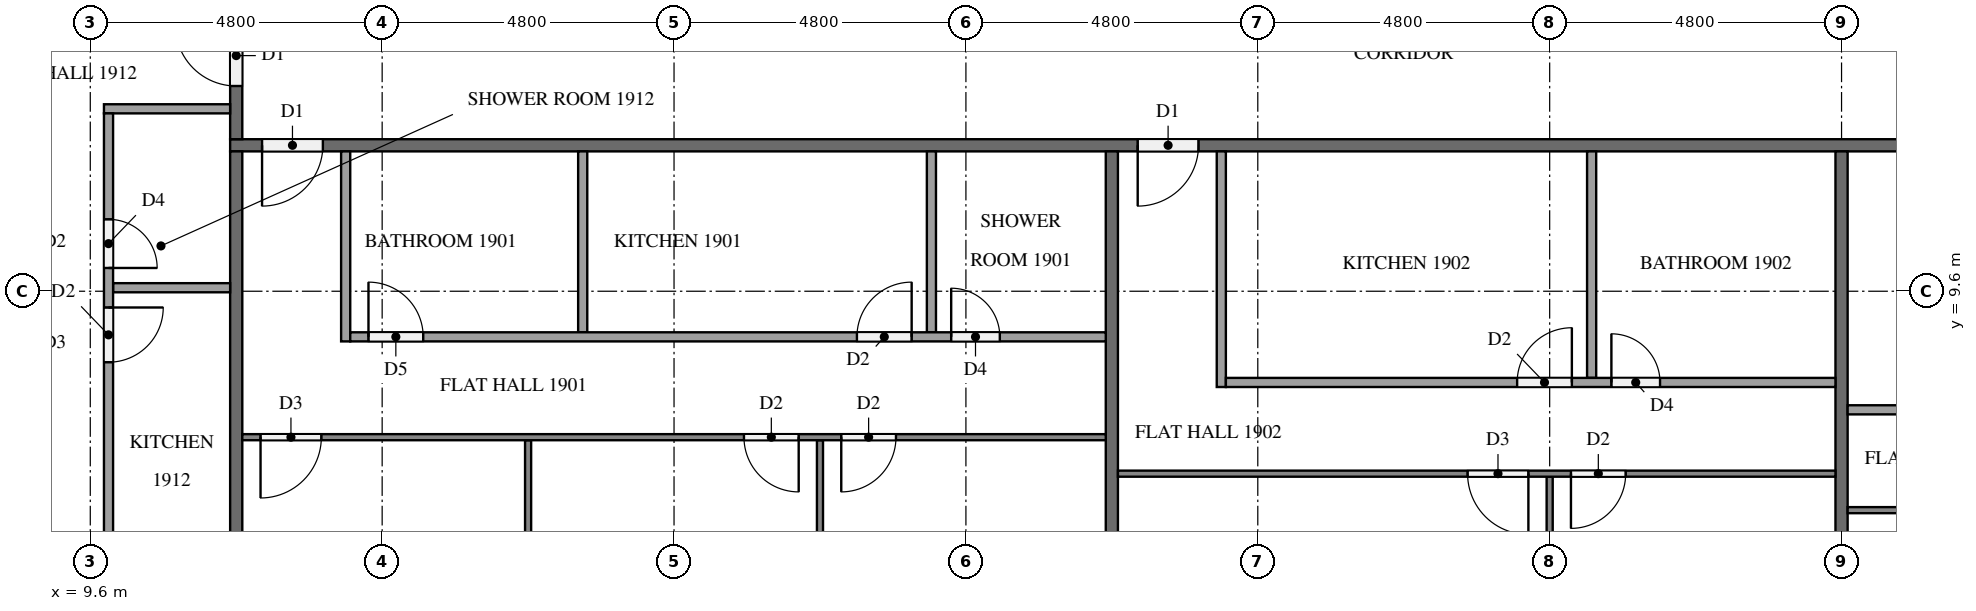
"""IFC4 building model, lengths in metres.
Left out: names, types, materials, properties, quantities, classifications, styles, units other than length and angle.
Written with IfcOpenShell. Run it as: python <this file> out.ifc"""

import sys

from ifc_helpers import new_model, si_unit, direction, frame, frame_2d, origin, place, context, subcontext, project, spatial, rectangle, extrude, element, fill, save


model = new_model("IFC4")
c1 = context("Model", 3, precision=1e-05, world=origin(), true_north=direction((0.0, 1.0)))
c2 = subcontext(c1, "Body", "Model", "MODEL_VIEW")
j1 = project(units=[si_unit("LENGTHUNIT", "METRE"), si_unit("PLANEANGLEUNIT", "RADIAN")], contexts=[c1])
p1 = place(None, origin())
s1 = spatial("IfcSite", under=j1, at=p1, CompositionType="ELEMENT")
p2 = place(p1, origin())
s2 = spatial("IfcBuilding", under=s1, at=p2, CompositionType="ELEMENT")
p3 = place(p2, frame((0.0, 0.0, 76.8)))
s3 = spatial("IfcBuildingStorey", under=s2, at=p3, CompositionType="ELEMENT", Elevation=76.8)
p4 = place(p3, frame((50.5, 12.0, 0.0), z_axis=(0.0, 0.0, 1.0), x_axis=(-1.0, 0.0, 0.0)))
e1 = element("IfcWall", 1, at=p4, inside=s3, PredefinedType="PARTITIONING", context=c2, shape_type="SweptSolid", body=[
    extrude(rectangle(XDim=38.6, YDim=0.2, at=frame_2d((19.3, 0.0))), origin(), (0.0, 0.0, 1.0), 3.2),
])
p5 = place(p4, frame((37.075, 0.0, 0.0)))
e2 = element("IfcOpeningElement", 2, at=p5, cuts=e1, PredefinedType="OPENING", context=c2, shape_type="SweptSolid", body=[
    extrude(rectangle(XDim=1.0, YDim=2.1, at=frame_2d((0.5, 1.05))), frame((0.0, 0.11, 0.0), z_axis=(0.0, -1.0, 0.0), x_axis=(1.0, 0.0, 0.0)), (0.0, 0.0, 1.0), 0.22),
])
p6 = place(p4, frame((22.675, 0.0, 0.0)))
e3 = element("IfcOpeningElement", 3, at=p6, cuts=e1, PredefinedType="OPENING", context=c2, shape_type="SweptSolid", body=[
    extrude(rectangle(XDim=1.0, YDim=2.1, at=frame_2d((0.5, 1.05))), frame((0.0, 0.11, 0.0), z_axis=(0.0, -1.0, 0.0), x_axis=(1.0, 0.0, 0.0)), (0.0, 0.0, 1.0), 0.22),
])
p7 = place(p4, frame((0.525, 0.0, 0.0)))
e4 = element("IfcOpeningElement", 4, at=p7, cuts=e1, PredefinedType="OPENING", context=c2, shape_type="SweptSolid", body=[
    extrude(rectangle(XDim=1.0, YDim=2.1, at=frame_2d((0.5, 1.05))), frame((0.0, 0.11, 0.0), z_axis=(0.0, -1.0, 0.0), x_axis=(1.0, 0.0, 0.0)), (0.0, 0.0, 1.0), 0.22),
])
p8 = place(p3, frame((12.0, 12.1, 0.0), z_axis=(0.0, 0.0, 1.0), x_axis=(0.0, 1.0, 0.0)))
e5 = element("IfcWall", 5, at=p8, inside=s3, PredefinedType="PARTITIONING", context=c2, shape_type="SweptSolid", body=[
    extrude(rectangle(XDim=28.6, YDim=0.2, at=frame_2d((14.3, 0.0))), origin(), (0.0, 0.0, 1.0), 3.2),
])
p9 = place(p8, frame((14.725, 0.0, 0.0)))
e6 = element("IfcOpeningElement", 6, at=p9, cuts=e5, PredefinedType="OPENING", context=c2, shape_type="SweptSolid", body=[
    extrude(rectangle(XDim=1.0, YDim=2.1, at=frame_2d((0.5, 1.05))), frame((0.0, 0.11, 0.0), z_axis=(0.0, -1.0, 0.0), x_axis=(1.0, 0.0, 0.0)), (0.0, 0.0, 1.0), 0.22),
])
p10 = place(p8, frame((12.875, 0.0, 0.0)))
e7 = element("IfcOpeningElement", 7, at=p10, cuts=e5, PredefinedType="OPENING", context=c2, shape_type="SweptSolid", body=[
    extrude(rectangle(XDim=1.0, YDim=2.1, at=frame_2d((0.5, 1.05))), frame((0.0, 0.11, 0.0), z_axis=(0.0, -1.0, 0.0), x_axis=(1.0, 0.0, 0.0)), (0.0, 0.0, 1.0), 0.22),
])
p11 = place(p8, frame((0.875, 0.0, 0.0)))
e8 = element("IfcOpeningElement", 8, at=p11, cuts=e5, PredefinedType="OPENING", context=c2, shape_type="SweptSolid", body=[
    extrude(rectangle(XDim=1.0, YDim=2.1, at=frame_2d((0.5, 1.05))), frame((0.0, 0.11, 0.0), z_axis=(0.0, -1.0, 0.0), x_axis=(1.0, 0.0, 0.0)), (0.0, 0.0, 1.0), 0.22),
])
for number, where, z_axis, x_axis in (
    (9, (26.4, 11.9, 0.0), (0.0, 0.0, 1.0), (0.0, -1.0, 0.0)),
    (10, (12.0, 0.1, 0.0), (0.0, 0.0, 1.0), (0.0, 1.0, 0.0)),
):
    element("IfcWall", number, at=place(p3, frame(where, z_axis=z_axis, x_axis=x_axis)), inside=s3, PredefinedType="PARTITIONING", context=c2, shape_type="SweptSolid", body=[
        extrude(rectangle(XDim=11.8, YDim=0.2, at=frame_2d((5.9, 0.0))), origin(), (0.0, 0.0, 1.0), 3.2),
    ])
p12 = place(p3, frame((38.4, 11.9, 0.0), z_axis=(0.0, 0.0, 1.0), x_axis=(0.0, -1.0, 0.0)))
e11 = element("IfcWall", 11, at=p12, inside=s3, PredefinedType="PARTITIONING", context=c2, shape_type="SweptSolid", body=[
    extrude(rectangle(XDim=11.475, YDim=0.2, at=frame_2d((5.737, 0.0))), origin(), (0.0, 0.0, 1.0), 3.2),
])
for number, where, z_axis, x_axis in (
    (12, (16.8, 7.15, 0.0), (0.0, 0.0, 1.0), (0.0, -1.0, 0.0)),
    (13, (21.6, 7.15, 0.0), (0.0, 0.0, 1.0), (0.0, -1.0, 0.0)),
):
    element("IfcWall", number, at=place(p3, frame(where, z_axis=z_axis, x_axis=x_axis)), inside=s3, PredefinedType="PARTITIONING", context=c2, shape_type="SweptSolid", body=[
        extrude(rectangle(XDim=7.05, YDim=0.1, at=frame_2d((3.525, 0.0))), origin(), (0.0, 0.0, 1.0), 3.2),
    ])
p13 = place(p3, frame((26.3, 7.2, 0.0), z_axis=(0.0, 0.0, 1.0), x_axis=(-1.0, 0.0, 0.0)))
e14 = element("IfcWall", 14, at=p13, inside=s3, PredefinedType="PARTITIONING", context=c2, shape_type="SweptSolid", body=[
    extrude(rectangle(XDim=14.2, YDim=0.1, at=frame_2d((7.1, 0.0))), origin(), (0.0, 0.0, 1.0), 3.2),
])
p14 = place(p13, frame((12.9, 0.0, 0.0)))
e15 = element("IfcOpeningElement", 15, at=p14, cuts=e14, PredefinedType="OPENING", context=c2, shape_type="SweptSolid", body=[
    extrude(rectangle(XDim=1.0, YDim=2.1, at=frame_2d((0.5, 1.05))), frame((0.0, 0.06, 0.0), z_axis=(0.0, -1.0, 0.0), x_axis=(1.0, 0.0, 0.0)), (0.0, 0.0, 1.0), 0.12),
])
p15 = place(p13, frame((5.05, 0.0, 0.0)))
e16 = element("IfcOpeningElement", 16, at=p15, cuts=e14, PredefinedType="OPENING", context=c2, shape_type="SweptSolid", body=[
    extrude(rectangle(XDim=0.9, YDim=2.1, at=frame_2d((0.45, 1.05))), frame((0.0, 0.06, 0.0), z_axis=(0.0, -1.0, 0.0), x_axis=(1.0, 0.0, 0.0)), (0.0, 0.0, 1.0), 0.12),
])
p16 = place(p13, frame((3.45, 0.0, 0.0)))
e17 = element("IfcOpeningElement", 17, at=p16, cuts=e14, PredefinedType="OPENING", context=c2, shape_type="SweptSolid", body=[
    extrude(rectangle(XDim=0.9, YDim=2.1, at=frame_2d((0.45, 1.05))), frame((0.0, 0.06, 0.0), z_axis=(0.0, -1.0, 0.0), x_axis=(1.0, 0.0, 0.0)), (0.0, 0.0, 1.0), 0.12),
])
for number, where, z_axis, x_axis in (
    (18, (17.698, 11.9, 0.0), (0.0, 0.0, 1.0), (0.0, -1.0, 0.0)),
    (19, (23.433, 11.9, 0.0), (0.0, 0.0, 1.0), (0.0, -1.0, 0.0)),
):
    element("IfcWall", number, at=place(p3, frame(where, z_axis=z_axis, x_axis=x_axis)), inside=s3, PredefinedType="PARTITIONING", context=c2, shape_type="SweptSolid", body=[
        extrude(rectangle(XDim=2.975, YDim=0.15, at=frame_2d((1.487, 0.0))), origin(), (0.0, 0.0, 1.0), 3.2),
    ])
p17 = place(p3, frame((13.8, 11.9, 0.0), z_axis=(0.0, 0.0, 1.0), x_axis=(0.0, -1.0, 0.0)))
e20 = element("IfcWall", 20, at=p17, inside=s3, PredefinedType="PARTITIONING", context=c2, shape_type="SweptSolid", body=[
    extrude(rectangle(XDim=3.125, YDim=0.15, at=frame_2d((1.562, 0.0))), origin(), (0.0, 0.0, 1.0), 3.2),
])
p18 = place(p3, frame((13.875, 8.85, 0.0), z_axis=(0.0, 0.0, 1.0), x_axis=(1.0, 0.0, 0.0)))
e21 = element("IfcWall", 21, at=p18, inside=s3, PredefinedType="PARTITIONING", context=c2, shape_type="SweptSolid", body=[
    extrude(rectangle(XDim=12.425, YDim=0.15, at=frame_2d((6.212, 0.0))), origin(), (0.0, 0.0, 1.0), 3.2),
])
p19 = place(p18, frame((0.3, 0.0, 0.0)))
e22 = element("IfcOpeningElement", 22, at=p19, cuts=e21, PredefinedType="OPENING", context=c2, shape_type="SweptSolid", body=[
    extrude(rectangle(XDim=0.9, YDim=2.1, at=frame_2d((0.45, 1.05))), frame((0.0, 0.085, 0.0), z_axis=(0.0, -1.0, 0.0), x_axis=(1.0, 0.0, 0.0)), (0.0, 0.0, 1.0), 0.17),
])
p20 = place(p18, frame((8.333, 0.0, 0.0)))
e23 = element("IfcOpeningElement", 23, at=p20, cuts=e21, PredefinedType="OPENING", context=c2, shape_type="SweptSolid", body=[
    extrude(rectangle(XDim=0.9, YDim=2.1, at=frame_2d((0.45, 1.05))), frame((0.0, 0.085, 0.0), z_axis=(0.0, -1.0, 0.0), x_axis=(1.0, 0.0, 0.0)), (0.0, 0.0, 1.0), 0.17),
])
p21 = place(p18, frame((9.883, 0.0, 0.0)))
e24 = element("IfcOpeningElement", 24, at=p21, cuts=e21, PredefinedType="OPENING", context=c2, shape_type="SweptSolid", body=[
    extrude(rectangle(XDim=0.8, YDim=2.1, at=frame_2d((0.4, 1.05))), frame((0.0, 0.085, 0.0), z_axis=(0.0, -1.0, 0.0), x_axis=(1.0, 0.0, 0.0)), (0.0, 0.0, 1.0), 0.17),
])
p22 = place(p3, frame((33.6, 6.55, 0.0), z_axis=(0.0, 0.0, 1.0), x_axis=(0.0, -1.0, 0.0)))
e25 = element("IfcWall", 25, at=p22, inside=s3, PredefinedType="PARTITIONING", context=c2, shape_type="SweptSolid", body=[
    extrude(rectangle(XDim=6.45, YDim=0.1, at=frame_2d((3.225, 0.0))), origin(), (0.0, 0.0, 1.0), 3.2),
])
p23 = place(p3, frame((38.3, 6.6, 0.0), z_axis=(0.0, 0.0, 1.0), x_axis=(-1.0, 0.0, 0.0)))
e26 = element("IfcWall", 26, at=p23, inside=s3, PredefinedType="PARTITIONING", context=c2, shape_type="SweptSolid", body=[
    extrude(rectangle(XDim=11.8, YDim=0.1, at=frame_2d((5.9, 0.0))), origin(), (0.0, 0.0, 1.0), 3.2),
])
p24 = place(p23, frame((5.05, 0.0, 0.0)))
e27 = element("IfcOpeningElement", 27, at=p24, cuts=e26, PredefinedType="OPENING", context=c2, shape_type="SweptSolid", body=[
    extrude(rectangle(XDim=1.0, YDim=2.1, at=frame_2d((0.5, 1.05))), frame((0.0, 0.06, 0.0), z_axis=(0.0, -1.0, 0.0), x_axis=(1.0, 0.0, 0.0)), (0.0, 0.0, 1.0), 0.12),
])
p25 = place(p23, frame((3.45, 0.0, 0.0)))
e28 = element("IfcOpeningElement", 28, at=p25, cuts=e26, PredefinedType="OPENING", context=c2, shape_type="SweptSolid", body=[
    extrude(rectangle(XDim=0.9, YDim=2.1, at=frame_2d((0.45, 1.05))), frame((0.0, 0.06, 0.0), z_axis=(0.0, -1.0, 0.0), x_axis=(1.0, 0.0, 0.0)), (0.0, 0.0, 1.0), 0.12),
])
p26 = place(p3, frame((34.29, 11.9, 0.0), z_axis=(0.0, 0.0, 1.0), x_axis=(0.0, -1.0, 0.0)))
e29 = element("IfcWall", 29, at=p26, inside=s3, PredefinedType="PARTITIONING", context=c2, shape_type="SweptSolid", body=[
    extrude(rectangle(XDim=3.725, YDim=0.15, at=frame_2d((1.862, 0.0))), origin(), (0.0, 0.0, 1.0), 3.2),
])
p27 = place(p3, frame((28.2, 11.9, 0.0), z_axis=(0.0, 0.0, 1.0), x_axis=(0.0, -1.0, 0.0)))
e30 = element("IfcWall", 30, at=p27, inside=s3, PredefinedType="PARTITIONING", context=c2, shape_type="SweptSolid", body=[
    extrude(rectangle(XDim=3.875, YDim=0.15, at=frame_2d((1.938, 0.0))), origin(), (0.0, 0.0, 1.0), 3.2),
])
p28 = place(p3, frame((28.275, 8.1, 0.0), z_axis=(0.0, 0.0, 1.0), x_axis=(1.0, 0.0, 0.0)))
e31 = element("IfcWall", 31, at=p28, inside=s3, PredefinedType="PARTITIONING", context=c2, shape_type="SweptSolid", body=[
    extrude(rectangle(XDim=10.025, YDim=0.15, at=frame_2d((5.013, 0.0))), origin(), (0.0, 0.0, 1.0), 3.2),
])
p29 = place(p28, frame((4.79, 0.0, 0.0)))
e32 = element("IfcOpeningElement", 32, at=p29, cuts=e31, PredefinedType="OPENING", context=c2, shape_type="SweptSolid", body=[
    extrude(rectangle(XDim=0.9, YDim=2.1, at=frame_2d((0.45, 1.05))), frame((0.0, 0.085, 0.0), z_axis=(0.0, -1.0, 0.0), x_axis=(1.0, 0.0, 0.0)), (0.0, 0.0, 1.0), 0.17),
])
p30 = place(p28, frame((6.34, 0.0, 0.0)))
e33 = element("IfcOpeningElement", 33, at=p30, cuts=e31, PredefinedType="OPENING", context=c2, shape_type="SweptSolid", body=[
    extrude(rectangle(XDim=0.8, YDim=2.1, at=frame_2d((0.4, 1.05))), frame((0.0, 0.085, 0.0), z_axis=(0.0, -1.0, 0.0), x_axis=(1.0, 0.0, 0.0)), (0.0, 0.0, 1.0), 0.17),
])
p31 = place(p3, frame((50.3, 6.0, 0.0), z_axis=(0.0, 0.0, 1.0), x_axis=(-1.0, 0.0, 0.0)))
e34 = element("IfcWall", 34, at=p31, inside=s3, PredefinedType="PARTITIONING", context=c2, shape_type="SweptSolid", body=[
    extrude(rectangle(XDim=11.8, YDim=0.1, at=frame_2d((5.9, 0.0))), origin(), (0.0, 0.0, 1.0), 3.2),
])
p32 = place(p31, frame((5.75, 0.0, 0.0)))
e35 = element("IfcOpeningElement", 35, at=p32, cuts=e34, PredefinedType="OPENING", context=c2, shape_type="SweptSolid", body=[
    extrude(rectangle(XDim=1.0, YDim=2.1, at=frame_2d((0.5, 1.05))), frame((0.0, 0.06, 0.0), z_axis=(0.0, -1.0, 0.0), x_axis=(1.0, 0.0, 0.0)), (0.0, 0.0, 1.0), 0.12),
])
p33 = place(p31, frame((7.45, 0.0, 0.0)))
e36 = element("IfcOpeningElement", 36, at=p33, cuts=e34, PredefinedType="OPENING", context=c2, shape_type="SweptSolid", body=[
    extrude(rectangle(XDim=0.9, YDim=2.1, at=frame_2d((0.45, 1.05))), frame((0.0, 0.06, 0.0), z_axis=(0.0, -1.0, 0.0), x_axis=(1.0, 0.0, 0.0)), (0.0, 0.0, 1.0), 0.12),
])
p34 = place(p3, frame((38.5, 7.65, 0.0), z_axis=(0.0, 0.0, 1.0), x_axis=(1.0, 0.0, 0.0)))
e37 = element("IfcWall", 37, at=p34, inside=s3, PredefinedType="PARTITIONING", context=c2, shape_type="SweptSolid", body=[
    extrude(rectangle(XDim=10.025, YDim=0.15, at=frame_2d((5.012, 0.0))), origin(), (0.0, 0.0, 1.0), 3.2),
])
p35 = place(p34, frame((6.34, 0.0, 0.0)))
e38 = element("IfcOpeningElement", 38, at=p35, cuts=e37, PredefinedType="OPENING", context=c2, shape_type="SweptSolid", body=[
    extrude(rectangle(XDim=0.8, YDim=2.1, at=frame_2d((0.4, 1.05))), frame((0.0, 0.085, 0.0), z_axis=(0.0, -1.0, 0.0), x_axis=(1.0, 0.0, 0.0)), (0.0, 0.0, 1.0), 0.17),
])
p36 = place(p34, frame((4.79, 0.0, 0.0)))
e39 = element("IfcOpeningElement", 39, at=p36, cuts=e37, PredefinedType="OPENING", context=c2, shape_type="SweptSolid", body=[
    extrude(rectangle(XDim=0.9, YDim=2.1, at=frame_2d((0.45, 1.05))), frame((0.0, 0.085, 0.0), z_axis=(0.0, -1.0, 0.0), x_axis=(1.0, 0.0, 0.0)), (0.0, 0.0, 1.0), 0.17),
])
p37 = place(p3, frame((11.9, 9.658, 0.0), z_axis=(0.0, 0.0, 1.0), x_axis=(-1.0, 0.0, 0.0)))
e40 = element("IfcWall", 40, at=p37, inside=s3, PredefinedType="PARTITIONING", context=c2, shape_type="SweptSolid", body=[
    extrude(rectangle(XDim=1.925, YDim=0.15, at=frame_2d((0.962, 0.0))), origin(), (0.0, 0.0, 1.0), 3.2),
])
p38 = place(p3, frame((11.9, 12.6, 0.0), z_axis=(0.0, 0.0, 1.0), x_axis=(-1.0, 0.0, 0.0)))
e41 = element("IfcWall", 41, at=p38, inside=s3, PredefinedType="PARTITIONING", context=c2, shape_type="SweptSolid", body=[
    extrude(rectangle(XDim=2.075, YDim=0.15, at=frame_2d((1.038, 0.0))), origin(), (0.0, 0.0, 1.0), 3.2),
])
p39 = place(p3, frame((9.9, 12.525, 0.0), z_axis=(0.0, 0.0, 1.0), x_axis=(0.0, -1.0, 0.0)))
e42 = element("IfcWall", 42, at=p39, inside=s3, PredefinedType="PARTITIONING", context=c2, shape_type="SweptSolid", body=[
    extrude(rectangle(XDim=11.95, YDim=0.15, at=frame_2d((5.975, 0.0))), origin(), (0.0, 0.0, 1.0), 3.2),
])
p40 = place(p39, frame((1.742, 0.0, 0.0)))
e43 = element("IfcOpeningElement", 43, at=p40, cuts=e42, PredefinedType="OPENING", context=c2, shape_type="SweptSolid", body=[
    extrude(rectangle(XDim=0.8, YDim=2.1, at=frame_2d((0.4, 1.05))), frame((0.0, 0.085, 0.0), z_axis=(0.0, -1.0, 0.0), x_axis=(1.0, 0.0, 0.0)), (0.0, 0.0, 1.0), 0.17),
])
p41 = place(p39, frame((3.192, 0.0, 0.0)))
e44 = element("IfcOpeningElement", 44, at=p41, cuts=e42, PredefinedType="OPENING", context=c2, shape_type="SweptSolid", body=[
    extrude(rectangle(XDim=0.9, YDim=2.1, at=frame_2d((0.45, 1.05))), frame((0.0, 0.085, 0.0), z_axis=(0.0, -1.0, 0.0), x_axis=(1.0, 0.0, 0.0)), (0.0, 0.0, 1.0), 0.17),
])
p42 = place(p39, frame((10.75, 0.0, 0.0)))
e45 = element("IfcOpeningElement", 45, at=p42, cuts=e42, PredefinedType="OPENING", context=c2, shape_type="SweptSolid", body=[
    extrude(rectangle(XDim=0.9, YDim=2.1, at=frame_2d((0.45, 1.05))), frame((0.0, 0.085, 0.0), z_axis=(0.0, -1.0, 0.0), x_axis=(1.0, 0.0, 0.0)), (0.0, 0.0, 1.0), 0.17),
])
p43 = place(p5, origin())
e46 = element("IfcDoor", 46, at=p43, inside=s3, OperationType="SINGLE_SWING_RIGHT", PredefinedType="DOOR", context=c2, shape_type="SweptSolid", body=[
    extrude(rectangle(XDim=1.0, YDim=2.1, at=frame_2d((0.5, 1.05))), frame((0.0, 0.025, 0.0), z_axis=(0.0, -1.0, 0.0), x_axis=(1.0, 0.0, 0.0)), (0.0, 0.0, 1.0), 0.05),
])
fill(e2, e46)
p44 = place(p6, origin())
e47 = element("IfcDoor", 47, at=p44, inside=s3, OperationType="SINGLE_SWING_RIGHT", PredefinedType="DOOR", context=c2, shape_type="SweptSolid", body=[
    extrude(rectangle(XDim=1.0, YDim=2.1, at=frame_2d((0.5, 1.05))), frame((0.0, 0.025, 0.0), z_axis=(0.0, -1.0, 0.0), x_axis=(1.0, 0.0, 0.0)), (0.0, 0.0, 1.0), 0.05),
])
fill(e3, e47)
p45 = place(p11, origin())
e48 = element("IfcDoor", 48, at=p45, inside=s3, OperationType="SINGLE_SWING_RIGHT", PredefinedType="DOOR", context=c2, shape_type="SweptSolid", body=[
    extrude(rectangle(XDim=1.0, YDim=2.1, at=frame_2d((0.5, 1.05))), frame((0.0, 0.025, 0.0), z_axis=(0.0, -1.0, 0.0), x_axis=(1.0, 0.0, 0.0)), (0.0, 0.0, 1.0), 0.05),
])
fill(e8, e48)
p46 = place(p14, origin())
e49 = element("IfcDoor", 49, at=p46, inside=s3, OperationType="SINGLE_SWING_RIGHT", PredefinedType="DOOR", context=c2, shape_type="SweptSolid", body=[
    extrude(rectangle(XDim=1.0, YDim=2.1, at=frame_2d((0.5, 1.05))), frame((0.0, 0.025, 0.0), z_axis=(0.0, -1.0, 0.0), x_axis=(1.0, 0.0, 0.0)), (0.0, 0.0, 1.0), 0.05),
])
fill(e15, e49)
p47 = place(p15, origin())
e50 = element("IfcDoor", 50, at=p47, inside=s3, OperationType="SINGLE_SWING_LEFT", PredefinedType="DOOR", context=c2, shape_type="SweptSolid", body=[
    extrude(rectangle(XDim=0.9, YDim=2.1, at=frame_2d((0.45, 1.05))), frame((0.0, 0.025, 0.0), z_axis=(0.0, -1.0, 0.0), x_axis=(1.0, 0.0, 0.0)), (0.0, 0.0, 1.0), 0.05),
])
fill(e16, e50)
p48 = place(p16, origin())
e51 = element("IfcDoor", 51, at=p48, inside=s3, OperationType="SINGLE_SWING_RIGHT", PredefinedType="DOOR", context=c2, shape_type="SweptSolid", body=[
    extrude(rectangle(XDim=0.9, YDim=2.1, at=frame_2d((0.45, 1.05))), frame((0.0, 0.025, 0.0), z_axis=(0.0, -1.0, 0.0), x_axis=(1.0, 0.0, 0.0)), (0.0, 0.0, 1.0), 0.05),
])
fill(e17, e51)
p49 = place(p19, origin())
e52 = element("IfcDoor", 52, at=p49, inside=s3, OperationType="SINGLE_SWING_LEFT", PredefinedType="DOOR", context=c2, shape_type="SweptSolid", body=[
    extrude(rectangle(XDim=0.9, YDim=2.1, at=frame_2d((0.45, 1.05))), frame((0.0, 0.025, 0.0), z_axis=(0.0, -1.0, 0.0), x_axis=(1.0, 0.0, 0.0)), (0.0, 0.0, 1.0), 0.05),
])
fill(e22, e52)
p50 = place(p20, origin())
e53 = element("IfcDoor", 53, at=p50, inside=s3, OperationType="SINGLE_SWING_RIGHT", PredefinedType="DOOR", context=c2, shape_type="SweptSolid", body=[
    extrude(rectangle(XDim=0.9, YDim=2.1, at=frame_2d((0.45, 1.05))), frame((0.0, 0.025, 0.0), z_axis=(0.0, -1.0, 0.0), x_axis=(1.0, 0.0, 0.0)), (0.0, 0.0, 1.0), 0.05),
])
fill(e23, e53)
p51 = place(p21, origin())
e54 = element("IfcDoor", 54, at=p51, inside=s3, OperationType="SINGLE_SWING_LEFT", PredefinedType="DOOR", context=c2, shape_type="SweptSolid", body=[
    extrude(rectangle(XDim=0.8, YDim=2.1, at=frame_2d((0.4, 1.05))), frame((0.0, 0.025, 0.0), z_axis=(0.0, -1.0, 0.0), x_axis=(1.0, 0.0, 0.0)), (0.0, 0.0, 1.0), 0.05),
])
fill(e24, e54)
p52 = place(p24, origin())
e55 = element("IfcDoor", 55, at=p52, inside=s3, OperationType="SINGLE_SWING_LEFT", PredefinedType="DOOR", context=c2, shape_type="SweptSolid", body=[
    extrude(rectangle(XDim=1.0, YDim=2.1, at=frame_2d((0.5, 1.05))), frame((0.0, 0.025, 0.0), z_axis=(0.0, -1.0, 0.0), x_axis=(1.0, 0.0, 0.0)), (0.0, 0.0, 1.0), 0.05),
])
fill(e27, e55)
p53 = place(p25, origin())
e56 = element("IfcDoor", 56, at=p53, inside=s3, OperationType="SINGLE_SWING_RIGHT", PredefinedType="DOOR", context=c2, shape_type="SweptSolid", body=[
    extrude(rectangle(XDim=0.9, YDim=2.1, at=frame_2d((0.45, 1.05))), frame((0.0, 0.025, 0.0), z_axis=(0.0, -1.0, 0.0), x_axis=(1.0, 0.0, 0.0)), (0.0, 0.0, 1.0), 0.05),
])
fill(e28, e56)
p54 = place(p29, origin())
e57 = element("IfcDoor", 57, at=p54, inside=s3, OperationType="SINGLE_SWING_RIGHT", PredefinedType="DOOR", context=c2, shape_type="SweptSolid", body=[
    extrude(rectangle(XDim=0.9, YDim=2.1, at=frame_2d((0.45, 1.05))), frame((0.0, 0.025, 0.0), z_axis=(0.0, -1.0, 0.0), x_axis=(1.0, 0.0, 0.0)), (0.0, 0.0, 1.0), 0.05),
])
fill(e32, e57)
p55 = place(p30, origin())
e58 = element("IfcDoor", 58, at=p55, inside=s3, OperationType="SINGLE_SWING_LEFT", PredefinedType="DOOR", context=c2, shape_type="SweptSolid", body=[
    extrude(rectangle(XDim=0.8, YDim=2.1, at=frame_2d((0.4, 1.05))), frame((0.0, 0.025, 0.0), z_axis=(0.0, -1.0, 0.0), x_axis=(1.0, 0.0, 0.0)), (0.0, 0.0, 1.0), 0.05),
])
fill(e33, e58)
p56 = place(p40, origin())
e59 = element("IfcDoor", 59, at=p56, inside=s3, OperationType="SINGLE_SWING_RIGHT", PredefinedType="DOOR", context=c2, shape_type="SweptSolid", body=[
    extrude(rectangle(XDim=0.8, YDim=2.1, at=frame_2d((0.4, 1.05))), frame((0.0, 0.025, 0.0), z_axis=(0.0, -1.0, 0.0), x_axis=(1.0, 0.0, 0.0)), (0.0, 0.0, 1.0), 0.05),
])
fill(e43, e59)
p57 = place(p41, origin())
e60 = element("IfcDoor", 60, at=p57, inside=s3, OperationType="SINGLE_SWING_LEFT", PredefinedType="DOOR", context=c2, shape_type="SweptSolid", body=[
    extrude(rectangle(XDim=0.9, YDim=2.1, at=frame_2d((0.45, 1.05))), frame((0.0, 0.025, 0.0), z_axis=(0.0, -1.0, 0.0), x_axis=(1.0, 0.0, 0.0)), (0.0, 0.0, 1.0), 0.05),
])
fill(e44, e60)
save(model, sys.argv[1])
